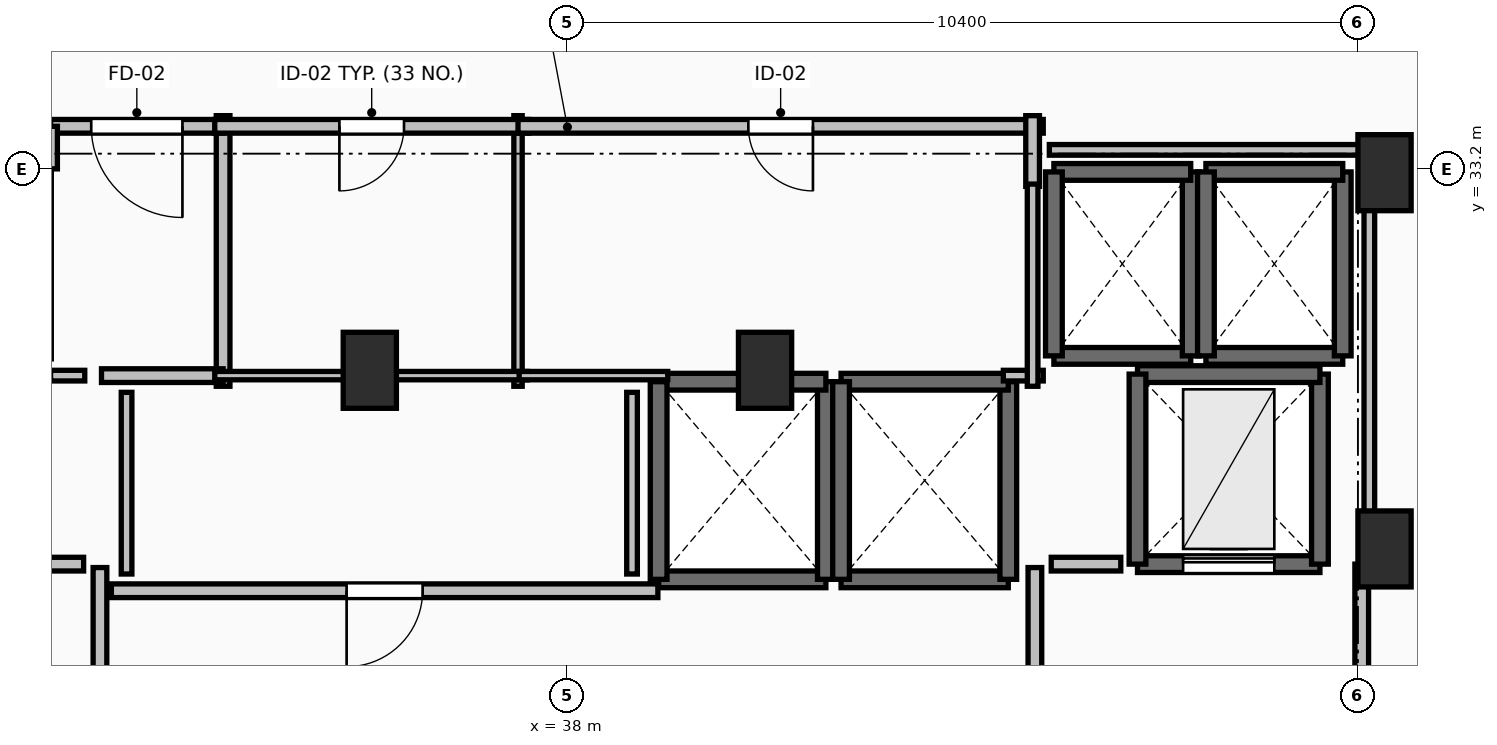
"""IFC4 building model, lengths in metres.
Left out: names, types, materials, properties, quantities, classifications, styles, units other than length and angle.
Written with IfcOpenShell. Run it as: python <this file> out.ifc"""

import sys

from ifc_helpers import new_model, si_unit, direction, frame, frame_2d, origin, origin_2d, place, context, subcontext, project, spatial, rectangle, extrude, element, fill, save


model = new_model("IFC4")
c1 = context("Model", 3, precision=1e-05, world=origin(), true_north=direction((0.0, 1.0)))
c2 = subcontext(c1, "Body", "Model", "MODEL_VIEW")
j1 = project(units=[si_unit("LENGTHUNIT", "METRE"), si_unit("PLANEANGLEUNIT", "RADIAN")], contexts=[c1])
p1 = place(None, origin())
s1 = spatial("IfcSite", under=j1, at=p1, CompositionType="ELEMENT")
p2 = place(p1, origin())
s2 = spatial("IfcBuilding", under=s1, at=p2, CompositionType="ELEMENT")
p3 = place(p2, frame((0.0, 0.0, 210.75)))
s3 = spatial("IfcBuildingStorey", under=s2, at=p3, CompositionType="ELEMENT", Elevation=210.75)
for number, where, z_axis, x_axis in (
    (1, (48.75, 33.15, 0.0), (0.0, 0.0, 1.0), (1.0, 0.0, 0.0)),
    (2, (48.75, 28.2, 0.0), (0.0, 0.0, 1.0), (1.0, 0.0, 0.0)),
    (3, (35.4, 30.55, 0.0), (0.0, 0.0, 1.0), (1.0, 0.0, 0.0)),
    (4, (40.6, 30.55, 0.0), (0.0, 0.0, 1.0), (1.0, 0.0, 0.0)),
):
    element("IfcColumn", number, at=place(p3, frame(where, z_axis=z_axis, x_axis=x_axis)), inside=s3, PredefinedType="PILASTER", context=c2, shape_type="SweptSolid", body=[
        extrude(rectangle(XDim=0.7, YDim=1.0, at=origin_2d()), origin(), (0.0, 0.0, 1.0), 3.55),
    ])
p4 = place(p3, frame((39.2, 27.8, 0.0), z_axis=(0.0, 0.0, 1.0), x_axis=(1.0, 0.0, 0.0)))
e5 = element("IfcWall", 5, at=p4, inside=s3, PredefinedType="SOLIDWALL", context=c2, shape_type="SweptSolid", body=[
    extrude(rectangle(XDim=2.2, YDim=0.22, at=frame_2d((1.1, 0.0))), origin(), (0.0, 0.0, 1.0), 3.29),
])
p5 = place(p3, frame((41.4, 27.8, 0.0), z_axis=(0.0, 0.0, 1.0), x_axis=(0.0, 1.0, 0.0)))
e6 = element("IfcWall", 6, at=p5, inside=s3, PredefinedType="SOLIDWALL", context=c2, shape_type="SweptSolid", body=[
    extrude(rectangle(XDim=2.6, YDim=0.22, at=frame_2d((1.3, 0.0))), origin(), (0.0, 0.0, 1.0), 3.29),
])
p6 = place(p3, frame((41.4, 30.4, 0.0), z_axis=(0.0, 0.0, 1.0), x_axis=(-1.0, 0.0, 0.0)))
e7 = element("IfcWall", 7, at=p6, inside=s3, PredefinedType="SOLIDWALL", context=c2, shape_type="SweptSolid", body=[
    extrude(rectangle(XDim=2.2, YDim=0.22, at=frame_2d((1.1, 0.0))), origin(), (0.0, 0.0, 1.0), 3.29),
])
p7 = place(p3, frame((39.2, 30.4, 0.0), z_axis=(0.0, 0.0, 1.0), x_axis=(0.0, -1.0, 0.0)))
e8 = element("IfcWall", 8, at=p7, inside=s3, PredefinedType="SOLIDWALL", context=c2, shape_type="SweptSolid", body=[
    extrude(rectangle(XDim=2.6, YDim=0.22, at=frame_2d((1.3, 0.0))), origin(), (0.0, 0.0, 1.0), 3.29),
])
p8 = place(p3, frame((41.6, 27.8, 0.0), z_axis=(0.0, 0.0, 1.0), x_axis=(1.0, 0.0, 0.0)))
e9 = element("IfcWall", 9, at=p8, inside=s3, PredefinedType="SOLIDWALL", context=c2, shape_type="SweptSolid", body=[
    extrude(rectangle(XDim=2.2, YDim=0.22, at=frame_2d((1.1, 0.0))), origin(), (0.0, 0.0, 1.0), 3.29),
])
p9 = place(p3, frame((43.8, 27.8, 0.0), z_axis=(0.0, 0.0, 1.0), x_axis=(0.0, 1.0, 0.0)))
e10 = element("IfcWall", 10, at=p9, inside=s3, PredefinedType="SOLIDWALL", context=c2, shape_type="SweptSolid", body=[
    extrude(rectangle(XDim=2.6, YDim=0.22, at=frame_2d((1.3, 0.0))), origin(), (0.0, 0.0, 1.0), 3.29),
])
p10 = place(p3, frame((43.8, 30.4, 0.0), z_axis=(0.0, 0.0, 1.0), x_axis=(-1.0, 0.0, 0.0)))
e11 = element("IfcWall", 11, at=p10, inside=s3, PredefinedType="SOLIDWALL", context=c2, shape_type="SweptSolid", body=[
    extrude(rectangle(XDim=2.2, YDim=0.22, at=frame_2d((1.1, 0.0))), origin(), (0.0, 0.0, 1.0), 3.29),
])
p11 = place(p3, frame((41.6, 30.4, 0.0), z_axis=(0.0, 0.0, 1.0), x_axis=(0.0, -1.0, 0.0)))
e12 = element("IfcWall", 12, at=p11, inside=s3, PredefinedType="SOLIDWALL", context=c2, shape_type="SweptSolid", body=[
    extrude(rectangle(XDim=2.6, YDim=0.22, at=frame_2d((1.3, 0.0))), origin(), (0.0, 0.0, 1.0), 3.29),
])
p12 = place(p3, frame((44.4, 30.74, 0.0), z_axis=(0.0, 0.0, 1.0), x_axis=(1.0, 0.0, 0.0)))
e13 = element("IfcWall", 13, at=p12, inside=s3, PredefinedType="SOLIDWALL", context=c2, shape_type="SweptSolid", body=[
    extrude(rectangle(XDim=1.8, YDim=0.22, at=frame_2d((0.9, 0.0))), origin(), (0.0, 0.0, 1.0), 3.29),
])
p13 = place(p3, frame((46.2, 30.74, 0.0), z_axis=(0.0, 0.0, 1.0), x_axis=(0.0, 1.0, 0.0)))
e14 = element("IfcWall", 14, at=p13, inside=s3, PredefinedType="SOLIDWALL", context=c2, shape_type="SweptSolid", body=[
    extrude(rectangle(XDim=2.42, YDim=0.22, at=frame_2d((1.21, 0.0))), origin(), (0.0, 0.0, 1.0), 3.29),
])
p14 = place(p3, frame((46.2, 33.16, 0.0), z_axis=(0.0, 0.0, 1.0), x_axis=(-1.0, 0.0, 0.0)))
e15 = element("IfcWall", 15, at=p14, inside=s3, PredefinedType="SOLIDWALL", context=c2, shape_type="SweptSolid", body=[
    extrude(rectangle(XDim=1.8, YDim=0.22, at=frame_2d((0.9, 0.0))), origin(), (0.0, 0.0, 1.0), 3.29),
])
p15 = place(p3, frame((44.4, 33.16, 0.0), z_axis=(0.0, 0.0, 1.0), x_axis=(0.0, -1.0, 0.0)))
e16 = element("IfcWall", 16, at=p15, inside=s3, PredefinedType="SOLIDWALL", context=c2, shape_type="SweptSolid", body=[
    extrude(rectangle(XDim=2.42, YDim=0.22, at=frame_2d((1.21, 0.0))), origin(), (0.0, 0.0, 1.0), 3.29),
])
p16 = place(p3, frame((46.4, 30.74, 0.0), z_axis=(0.0, 0.0, 1.0), x_axis=(1.0, 0.0, 0.0)))
e17 = element("IfcWall", 17, at=p16, inside=s3, PredefinedType="SOLIDWALL", context=c2, shape_type="SweptSolid", body=[
    extrude(rectangle(XDim=1.8, YDim=0.22, at=frame_2d((0.9, 0.0))), origin(), (0.0, 0.0, 1.0), 3.29),
])
p17 = place(p3, frame((48.2, 30.74, 0.0), z_axis=(0.0, 0.0, 1.0), x_axis=(0.0, 1.0, 0.0)))
e18 = element("IfcWall", 18, at=p17, inside=s3, PredefinedType="SOLIDWALL", context=c2, shape_type="SweptSolid", body=[
    extrude(rectangle(XDim=2.42, YDim=0.22, at=frame_2d((1.21, 0.0))), origin(), (0.0, 0.0, 1.0), 3.29),
])
p18 = place(p3, frame((48.2, 33.16, 0.0), z_axis=(0.0, 0.0, 1.0), x_axis=(-1.0, 0.0, 0.0)))
e19 = element("IfcWall", 19, at=p18, inside=s3, PredefinedType="SOLIDWALL", context=c2, shape_type="SweptSolid", body=[
    extrude(rectangle(XDim=1.8, YDim=0.22, at=frame_2d((0.9, 0.0))), origin(), (0.0, 0.0, 1.0), 3.29),
])
p19 = place(p3, frame((46.4, 33.16, 0.0), z_axis=(0.0, 0.0, 1.0), x_axis=(0.0, -1.0, 0.0)))
e20 = element("IfcWall", 20, at=p19, inside=s3, PredefinedType="SOLIDWALL", context=c2, shape_type="SweptSolid", body=[
    extrude(rectangle(XDim=2.42, YDim=0.22, at=frame_2d((1.21, 0.0))), origin(), (0.0, 0.0, 1.0), 3.29),
])
p20 = place(p3, frame((45.5, 28.0, 0.0), z_axis=(0.0, 0.0, 1.0), x_axis=(1.0, 0.0, 0.0)))
e21 = element("IfcWall", 21, at=p20, inside=s3, PredefinedType="SHEAR", context=c2, shape_type="SweptSolid", body=[
    extrude(rectangle(XDim=2.4, YDim=0.22, at=frame_2d((1.2, 0.0))), origin(), (0.0, 0.0, 1.0), 3.29),
])
p21 = place(p20, frame((0.6, 0.0, 0.0)))
e22 = element("IfcOpeningElement", 22, at=p21, cuts=e21, PredefinedType="OPENING", context=c2, shape_type="SweptSolid", body=[
    extrude(rectangle(XDim=1.2, YDim=2.2, at=frame_2d((0.6, 1.1))), frame((0.0, 0.125, 0.0), z_axis=(0.0, -1.0, 0.0), x_axis=(1.0, 0.0, 0.0)), (0.0, 0.0, 1.0), 0.25),
])
p22 = place(p3, frame((47.9, 28.0, 0.0), z_axis=(0.0, 0.0, 1.0), x_axis=(0.0, 1.0, 0.0)))
e23 = element("IfcWall", 23, at=p22, inside=s3, PredefinedType="SHEAR", context=c2, shape_type="SweptSolid", body=[
    extrude(rectangle(XDim=2.5, YDim=0.22, at=frame_2d((1.25, 0.0))), origin(), (0.0, 0.0, 1.0), 3.29),
])
p23 = place(p3, frame((47.9, 30.5, 0.0), z_axis=(0.0, 0.0, 1.0), x_axis=(-1.0, 0.0, 0.0)))
e24 = element("IfcWall", 24, at=p23, inside=s3, PredefinedType="SHEAR", context=c2, shape_type="SweptSolid", body=[
    extrude(rectangle(XDim=2.4, YDim=0.22, at=frame_2d((1.2, 0.0))), origin(), (0.0, 0.0, 1.0), 3.29),
])
p24 = place(p3, frame((45.5, 30.5, 0.0), z_axis=(0.0, 0.0, 1.0), x_axis=(0.0, -1.0, 0.0)))
e25 = element("IfcWall", 25, at=p24, inside=s3, PredefinedType="SHEAR", context=c2, shape_type="SweptSolid", body=[
    extrude(rectangle(XDim=2.5, YDim=0.22, at=frame_2d((1.25, 0.0))), origin(), (0.0, 0.0, 1.0), 3.29),
])
p25 = place(p3, frame((31.85, 24.045, 0.0), z_axis=(0.0, 0.0, 1.0), x_axis=(0.0, 1.0, 0.0)))
e26 = element("IfcWall", 26, at=p25, inside=s3, PredefinedType="PARTITIONING", context=c2, shape_type="SweptSolid", body=[
    extrude(rectangle(XDim=3.91, YDim=0.18, at=frame_2d((1.955, 0.0))), origin(), (0.0, 0.0, 1.0), 3.29),
])
p26 = place(p25, frame((1.355, 0.0, 0.0)))
e27 = element("IfcOpeningElement", 27, at=p26, cuts=e26, PredefinedType="OPENING", context=c2, shape_type="SweptSolid", body=[
    extrude(rectangle(XDim=1.2, YDim=2.15, at=frame_2d((0.6, 1.075))), frame((0.0, 0.105, 0.0), z_axis=(0.0, -1.0, 0.0), x_axis=(1.0, 0.0, 0.0)), (0.0, 0.0, 1.0), 0.21),
])
p27 = place(p3, frame((44.15, 27.955, 0.0), z_axis=(0.0, 0.0, 1.0), x_axis=(0.0, -1.0, 0.0)))
e28 = element("IfcWall", 28, at=p27, inside=s3, PredefinedType="PARTITIONING", context=c2, shape_type="SweptSolid", body=[
    extrude(rectangle(XDim=3.91, YDim=0.18, at=frame_2d((1.955, 0.0))), origin(), (0.0, 0.0, 1.0), 3.29),
])
p28 = place(p27, frame((1.355, 0.0, 0.0)))
e29 = element("IfcOpeningElement", 29, at=p28, cuts=e28, PredefinedType="OPENING", context=c2, shape_type="SweptSolid", body=[
    extrude(rectangle(XDim=1.2, YDim=2.15, at=frame_2d((0.6, 1.075))), frame((0.0, 0.105, 0.0), z_axis=(0.0, -1.0, 0.0), x_axis=(1.0, 0.0, 0.0)), (0.0, 0.0, 1.0), 0.21),
])
p29 = place(p3, frame((48.45, 23.95, 0.0), z_axis=(0.0, 0.0, 1.0), x_axis=(0.0, 1.0, 0.0)))
e30 = element("IfcWall", 30, at=p29, inside=s3, PredefinedType="PARTITIONING", context=c2, shape_type="SweptSolid", body=[
    extrude(rectangle(XDim=4.05, YDim=0.18, at=frame_2d((2.025, 0.0))), origin(), (0.0, 0.0, 1.0), 3.29),
])
p30 = place(p29, frame((1.425, 0.0, 0.0)))
e31 = element("IfcOpeningElement", 31, at=p30, cuts=e30, PredefinedType="OPENING", context=c2, shape_type="SweptSolid", body=[
    extrude(rectangle(XDim=1.2, YDim=2.15, at=frame_2d((0.6, 1.075))), frame((0.0, 0.105, 0.0), z_axis=(0.0, -1.0, 0.0), x_axis=(1.0, 0.0, 0.0)), (0.0, 0.0, 1.0), 0.21),
])
p31 = place(p3, frame((33.47, 30.34, 0.0), z_axis=(0.0, 0.0, 1.0), x_axis=(0.0, 1.0, 0.0)))
e32 = element("IfcWall", 32, at=p31, inside=s3, PredefinedType="PARTITIONING", context=c2, shape_type="SweptSolid", body=[
    extrude(rectangle(XDim=3.56, YDim=0.18, at=frame_2d((1.78, 0.0))), origin(), (0.0, 0.0, 1.0), 3.29),
])
p32 = place(p3, frame((31.87, 30.48, 0.0), z_axis=(0.0, 0.0, 1.0), x_axis=(1.0, 0.0, 0.0)))
e33 = element("IfcWall", 33, at=p32, inside=s3, PredefinedType="PARTITIONING", context=c2, shape_type="SweptSolid", body=[
    extrude(rectangle(XDim=1.6, YDim=0.18, at=frame_2d((0.8, 0.0))), origin(), (0.0, 0.0, 1.0), 3.29),
])
p33 = place(p3, frame((33.47, 33.76, 0.0), z_axis=(0.0, 0.0, 1.0), x_axis=(-1.0, 0.0, 0.0)))
e34 = element("IfcWall", 34, at=p33, inside=s3, PredefinedType="PARTITIONING", context=c2, shape_type="SweptSolid", body=[
    extrude(rectangle(XDim=2.27, YDim=0.18, at=frame_2d((1.135, 0.0))), origin(), (0.0, 0.0, 1.0), 3.29),
])
p34 = place(p33, frame((0.535, 0.0, 0.0)))
e35 = element("IfcOpeningElement", 35, at=p34, cuts=e34, PredefinedType="OPENING", context=c2, shape_type="SweptSolid", body=[
    extrude(rectangle(XDim=1.2, YDim=2.15, at=frame_2d((0.6, 1.075))), frame((0.0, 0.105, 0.0), z_axis=(0.0, -1.0, 0.0), x_axis=(1.0, 0.0, 0.0)), (0.0, 0.0, 1.0), 0.21),
])
p35 = place(p3, frame((31.2, 33.76, 0.0), z_axis=(0.0, 0.0, 1.0), x_axis=(0.0, -1.0, 0.0)))
e36 = element("IfcWall", 36, at=p35, inside=s3, PredefinedType="PARTITIONING", context=c2, shape_type="SweptSolid", body=[
    extrude(rectangle(XDim=0.56, YDim=0.18, at=frame_2d((0.28, 0.0))), origin(), (0.0, 0.0, 1.0), 3.29),
])
p36 = place(p3, frame((39.19, 27.65, 0.0), z_axis=(0.0, 0.0, 1.0), x_axis=(-1.0, 0.0, 0.0)))
e37 = element("IfcWall", 37, at=p36, inside=s3, PredefinedType="PARTITIONING", context=c2, shape_type="SweptSolid", body=[
    extrude(rectangle(XDim=7.19, YDim=0.18, at=frame_2d((3.595, 0.0))), origin(), (0.0, 0.0, 1.0), 3.29),
])
p37 = place(p36, frame((3.095, 0.0, 0.0)))
e38 = element("IfcOpeningElement", 38, at=p37, cuts=e37, PredefinedType="OPENING", context=c2, shape_type="SweptSolid", body=[
    extrude(rectangle(XDim=1.0, YDim=2.15, at=frame_2d((0.5, 1.075))), frame((0.0, 0.105, 0.0), z_axis=(0.0, -1.0, 0.0), x_axis=(1.0, 0.0, 0.0)), (0.0, 0.0, 1.0), 0.21),
])
p38 = place(p3, frame((37.35, 30.34, 0.0), z_axis=(0.0, 0.0, 1.0), x_axis=(0.0, 1.0, 0.0)))
e39 = element("IfcWall", 39, at=p38, inside=s3, PredefinedType="PARTITIONING", context=c2, shape_type="SweptSolid", body=[
    extrude(rectangle(XDim=3.56, YDim=0.11, at=frame_2d((1.78, 0.0))), origin(), (0.0, 0.0, 1.0), 2.482),
])
p39 = place(p3, frame((33.36, 30.48, 0.0), z_axis=(0.0, 0.0, 1.0), x_axis=(1.0, 0.0, 0.0)))
e40 = element("IfcWall", 40, at=p39, inside=s3, PredefinedType="PARTITIONING", context=c2, shape_type="SweptSolid", body=[
    extrude(rectangle(XDim=4.115, YDim=0.11, at=frame_2d((2.058, 0.0))), origin(), (0.0, 0.0, 1.0), 2.482),
])
p40 = place(p3, frame((37.49, 33.76, 0.0), z_axis=(0.0, 0.0, 1.0), x_axis=(-1.0, 0.0, 0.0)))
e41 = element("IfcWall", 41, at=p40, inside=s3, PredefinedType="PARTITIONING", context=c2, shape_type="SweptSolid", body=[
    extrude(rectangle(XDim=4.13, YDim=0.18, at=frame_2d((2.065, 0.0))), origin(), (0.0, 0.0, 1.0), 3.29),
])
p41 = place(p40, frame((1.64, 0.0, 0.0)))
e42 = element("IfcOpeningElement", 42, at=p41, cuts=e41, PredefinedType="OPENING", context=c2, shape_type="SweptSolid", body=[
    extrude(rectangle(XDim=0.85, YDim=2.1, at=frame_2d((0.425, 1.05))), frame((0.0, 0.105, 0.0), z_axis=(0.0, -1.0, 0.0), x_axis=(1.0, 0.0, 0.0)), (0.0, 0.0, 1.0), 0.21),
])
p42 = place(p3, frame((37.365, 30.48, 0.0), z_axis=(0.0, 0.0, 1.0), x_axis=(1.0, 0.0, 0.0)))
e43 = element("IfcWall", 43, at=p42, inside=s3, PredefinedType="PARTITIONING", context=c2, shape_type="SweptSolid", body=[
    extrude(rectangle(XDim=1.955, YDim=0.11, at=frame_2d((0.978, 0.0))), origin(), (0.0, 0.0, 1.0), 2.482),
])
p43 = place(p3, frame((44.26, 33.76, 0.0), z_axis=(0.0, 0.0, 1.0), x_axis=(-1.0, 0.0, 0.0)))
e44 = element("IfcWall", 44, at=p43, inside=s3, PredefinedType="PARTITIONING", context=c2, shape_type="SweptSolid", body=[
    extrude(rectangle(XDim=6.91, YDim=0.18, at=frame_2d((3.455, 0.0))), origin(), (0.0, 0.0, 1.0), 3.29),
])
p44 = place(p43, frame((3.03, 0.0, 0.0)))
e45 = element("IfcOpeningElement", 45, at=p44, cuts=e44, PredefinedType="OPENING", context=c2, shape_type="SweptSolid", body=[
    extrude(rectangle(XDim=0.85, YDim=2.1, at=frame_2d((0.425, 1.05))), frame((0.0, 0.105, 0.0), z_axis=(0.0, -1.0, 0.0), x_axis=(1.0, 0.0, 0.0)), (0.0, 0.0, 1.0), 0.21),
])
p45 = place(p3, frame((44.12, 32.97, 0.0), z_axis=(0.0, 0.0, 1.0), x_axis=(0.0, 1.0, 0.0)))
e46 = element("IfcWall", 46, at=p45, inside=s3, PredefinedType="PARTITIONING", context=c2, shape_type="SweptSolid", body=[
    extrude(rectangle(XDim=0.93, YDim=0.18, at=frame_2d((0.465, 0.0))), origin(), (0.0, 0.0, 1.0), 3.29),
])
for number, where, z_axis, x_axis in (
    (47, (31.635, 28.0, 0.0), (0.0, 0.0, 1.0), (-1.0, 0.0, 0.0)),
    (48, (45.28, 28.0, 0.0), (0.0, 0.0, 1.0), (-1.0, 0.0, 0.0)),
):
    element("IfcWall", number, at=place(p3, frame(where, z_axis=z_axis, x_axis=x_axis)), inside=s3, PredefinedType="PARTITIONING", context=c2, shape_type="SweptSolid", body=[
        extrude(rectangle(XDim=0.915, YDim=0.18, at=frame_2d((0.458, 0.0))), origin(), (0.0, 0.0, 1.0), 3.29),
    ])
p46 = place(p3, frame((31.2, 30.48, 0.0), z_axis=(0.0, 0.0, 1.0), x_axis=(1.0, 0.0, 0.0)))
e49 = element("IfcWall", 49, at=p46, inside=s3, PredefinedType="PARTITIONING", context=c2, shape_type="SweptSolid", body=[
    extrude(rectangle(XDim=0.45, YDim=0.14, at=frame_2d((0.225, 0.0))), origin(), (0.0, 0.0, 1.0), 3.29),
])
p47 = place(p3, frame((43.735, 30.48, 0.0), z_axis=(0.0, 0.0, 1.0), x_axis=(1.0, 0.0, 0.0)))
e50 = element("IfcWall", 50, at=p47, inside=s3, PredefinedType="PARTITIONING", context=c2, shape_type="SweptSolid", body=[
    extrude(rectangle(XDim=0.525, YDim=0.14, at=frame_2d((0.262, 0.0))), origin(), (0.0, 0.0, 1.0), 3.29),
])
p48 = place(p3, frame((44.12, 30.34, 0.0), z_axis=(0.0, 0.0, 1.0), x_axis=(0.0, 1.0, 0.0)))
e51 = element("IfcWall", 51, at=p48, inside=s3, PredefinedType="PARTITIONING", context=c2, shape_type="SweptSolid", body=[
    extrude(rectangle(XDim=2.66, YDim=0.14, at=frame_2d((1.33, 0.0))), origin(), (0.0, 0.0, 1.0), 3.29),
])
for number, where, z_axis, x_axis in (
    (52, (32.2, 30.26, 0.0), (0.0, 0.0, 1.0), (0.0, -1.0, 0.0)),
    (53, (38.85, 27.87, 0.0), (0.0, 0.0, 1.0), (0.0, 1.0, 0.0)),
):
    element("IfcWall", number, at=place(p3, frame(where, z_axis=z_axis, x_axis=x_axis)), inside=s3, PredefinedType="PARTITIONING", context=c2, shape_type="SweptSolid", body=[
        extrude(rectangle(XDim=2.39, YDim=0.14, at=frame_2d((1.195, 0.0))), origin(), (0.0, 0.0, 1.0), 3.29),
    ])
p49 = place(p3, frame((48.55, 28.196, 0.0), z_axis=(0.0, 0.0, 1.0), x_axis=(0.0, 1.0, 0.0)))
e54 = element("IfcWall", 54, at=p49, inside=s3, PredefinedType="PARTITIONING", context=c2, shape_type="SweptSolid", body=[
    extrude(rectangle(XDim=5.254, YDim=0.14, at=frame_2d((2.627, 0.0))), origin(), (0.0, 0.0, 1.0), 2.482),
])
p50 = place(p3, frame((48.55, 33.45, 0.0), z_axis=(0.0, 0.0, 1.0), x_axis=(-1.0, 0.0, 0.0)))
e55 = element("IfcWall", 55, at=p50, inside=s3, PredefinedType="PARTITIONING", context=c2, shape_type="SweptSolid", body=[
    extrude(rectangle(XDim=4.21, YDim=0.14, at=frame_2d((2.105, 0.0))), origin(), (0.0, 0.0, 1.0), 2.482),
])
p51 = place(p21, origin())
e56 = element("IfcDoor", 56, at=p51, inside=s3, OperationType="SLIDING_TO_LEFT", PredefinedType="DOOR", context=c2, shape_type="SweptSolid", body=[
    extrude(rectangle(XDim=1.2, YDim=2.2, at=frame_2d((0.6, 1.1))), frame((0.0, 0.025, 0.0), z_axis=(0.0, -1.0, 0.0), x_axis=(1.0, 0.0, 0.0)), (0.0, 0.0, 1.0), 0.05),
])
fill(e22, e56)
p52 = place(p34, origin())
e57 = element("IfcDoor", 57, at=p52, inside=s3, OperationType="SINGLE_SWING_LEFT", PredefinedType="DOOR", context=c2, shape_type="SweptSolid", body=[
    extrude(rectangle(XDim=1.2, YDim=2.15, at=frame_2d((0.6, 1.075))), frame((0.0, 0.025, 0.0), z_axis=(0.0, -1.0, 0.0), x_axis=(1.0, 0.0, 0.0)), (0.0, 0.0, 1.0), 0.05),
])
fill(e35, e57)
p53 = place(p37, origin())
e58 = element("IfcDoor", 58, at=p53, inside=s3, OperationType="SINGLE_SWING_RIGHT", PredefinedType="DOOR", context=c2, shape_type="SweptSolid", body=[
    extrude(rectangle(XDim=1.0, YDim=2.15, at=frame_2d((0.5, 1.075))), frame((0.0, 0.025, 0.0), z_axis=(0.0, -1.0, 0.0), x_axis=(1.0, 0.0, 0.0)), (0.0, 0.0, 1.0), 0.05),
])
fill(e38, e58)
p54 = place(p41, origin())
e59 = element("IfcDoor", 59, at=p54, inside=s3, OperationType="SINGLE_SWING_RIGHT", PredefinedType="DOOR", context=c2, shape_type="SweptSolid", body=[
    extrude(rectangle(XDim=0.85, YDim=2.1, at=frame_2d((0.425, 1.05))), frame((0.0, 0.025, 0.0), z_axis=(0.0, -1.0, 0.0), x_axis=(1.0, 0.0, 0.0)), (0.0, 0.0, 1.0), 0.05),
])
fill(e42, e59)
p55 = place(p44, origin())
e60 = element("IfcDoor", 60, at=p55, inside=s3, OperationType="SINGLE_SWING_LEFT", PredefinedType="DOOR", context=c2, shape_type="SweptSolid", body=[
    extrude(rectangle(XDim=0.85, YDim=2.1, at=frame_2d((0.425, 1.05))), frame((0.0, 0.025, 0.0), z_axis=(0.0, -1.0, 0.0), x_axis=(1.0, 0.0, 0.0)), (0.0, 0.0, 1.0), 0.05),
])
fill(e45, e60)
save(model, sys.argv[1])
